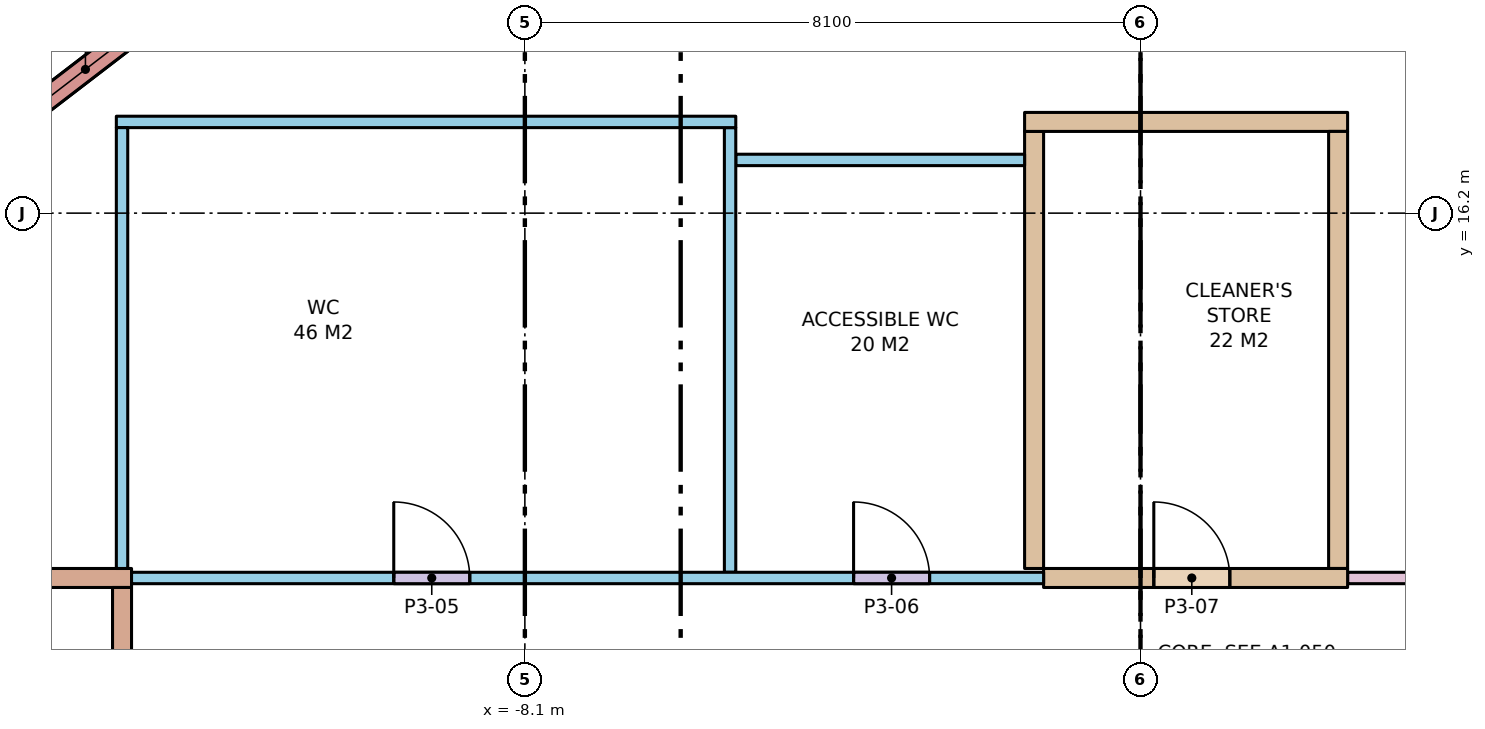
"""IFC4 building model, lengths in metres.
Left out: names, types, materials, properties, quantities, classifications, styles, units other than length and angle.
Written with IfcOpenShell. Run it as: python <this file> out.ifc"""

import sys

from ifc_helpers import new_model, si_unit, direction, frame, frame_2d, origin, place, context, subcontext, project, spatial, rectangle, extrude, element, fill, save


model = new_model("IFC4")
c1 = context("Model", 3, precision=1e-05, world=origin(), true_north=direction((0.0, 1.0)))
c2 = subcontext(c1, "Body", "Model", "MODEL_VIEW")
j1 = project(units=[si_unit("LENGTHUNIT", "METRE"), si_unit("PLANEANGLEUNIT", "RADIAN")], contexts=[c1])
p1 = place(None, origin())
s1 = spatial("IfcSite", under=j1, at=p1, CompositionType="ELEMENT")
p2 = place(p1, origin())
s2 = spatial("IfcBuilding", under=s1, at=p2, CompositionType="ELEMENT")
p3 = place(p2, frame((0.0, 0.0, 20.0)))
s3 = spatial("IfcBuildingStorey", under=s2, at=p3, CompositionType="ELEMENT", Elevation=20.0)
p4 = place(p3, frame((-11.5, 19.919, 0.0), z_axis=(0.0, 0.0, 1.0), x_axis=(-0.793339924758, -0.608778912074, 0.0)))
e1 = element("IfcWall", 1, at=p4, inside=s3, PredefinedType="STANDARD", context=c2, shape_type="SweptSolid", body=[
    extrude(rectangle(XDim=6.004, YDim=0.3, at=frame_2d((3.002, 0.0))), origin(), (0.0, 0.0, 1.0), 6.72),
])
p5 = place(p4, frame((1.702, 0.0, 0.8)))
e2 = element("IfcOpeningElement", 2, at=p5, cuts=e1, PredefinedType="OPENING", context=c2, shape_type="SweptSolid", body=[
    extrude(rectangle(XDim=2.6, YDim=5.4, at=frame_2d((1.3, 2.7))), frame((0.0, 0.16, 0.0), z_axis=(0.0, -1.0, 0.0), x_axis=(1.0, 0.0, 0.0)), (0.0, 0.0, 1.0), 0.32),
])
p6 = place(p3, frame((-1.4, 11.525, 0.0), z_axis=(0.0, 0.0, 1.0), x_axis=(0.0, 1.0, 0.0)))
e3 = element("IfcWall", 3, at=p6, inside=s3, PredefinedType="PARTITIONING", context=c2, shape_type="SweptSolid", body=[
    extrude(rectangle(XDim=5.75, YDim=0.25, at=frame_2d((2.875, 0.0))), origin(), (0.0, 0.0, 1.0), 6.72),
])
p7 = place(p3, frame((-5.325, 16.9, 0.0), z_axis=(0.0, 0.0, 1.0), x_axis=(1.0, 0.0, 0.0)))
e4 = element("IfcWall", 4, at=p7, inside=s3, PredefinedType="PARTITIONING", context=c2, shape_type="SweptSolid", body=[
    extrude(rectangle(XDim=3.8, YDim=0.15, at=frame_2d((1.9, 0.0))), origin(), (0.0, 0.0, 1.0), 6.72),
])
p8 = place(p3, frame((-5.4, 11.475, 0.0), z_axis=(0.0, 0.0, 1.0), x_axis=(0.0, 1.0, 0.0)))
e5 = element("IfcWall", 5, at=p8, inside=s3, PredefinedType="PARTITIONING", context=c2, shape_type="SweptSolid", body=[
    extrude(rectangle(XDim=5.85, YDim=0.15, at=frame_2d((2.925, 0.0))), origin(), (0.0, 0.0, 1.0), 6.72),
])
p9 = place(p3, frame((-1.525, 17.4, 0.0), z_axis=(0.0, 0.0, 1.0), x_axis=(1.0, 0.0, 0.0)))
e6 = element("IfcWall", 6, at=p9, inside=s3, PredefinedType="PARTITIONING", context=c2, shape_type="SweptSolid", body=[
    extrude(rectangle(XDim=4.25, YDim=0.25, at=frame_2d((2.125, 0.0))), origin(), (0.0, 0.0, 1.0), 6.72),
])
p10 = place(p3, frame((2.6, 11.525, 0.0), z_axis=(0.0, 0.0, 1.0), x_axis=(0.0, 1.0, 0.0)))
e7 = element("IfcWall", 7, at=p10, inside=s3, PredefinedType="PARTITIONING", context=c2, shape_type="SweptSolid", body=[
    extrude(rectangle(XDim=5.75, YDim=0.25, at=frame_2d((2.875, 0.0))), origin(), (0.0, 0.0, 1.0), 6.72),
])
p11 = place(p3, frame((-1.275, 11.4, 0.0), z_axis=(0.0, 0.0, 1.0), x_axis=(1.0, 0.0, 0.0)))
e8 = element("IfcWall", 8, at=p11, inside=s3, PredefinedType="PARTITIONING", context=c2, shape_type="SweptSolid", body=[
    extrude(rectangle(XDim=4.0, YDim=0.25, at=frame_2d((2.0, 0.0))), origin(), (0.0, 0.0, 1.0), 6.72),
])
p12 = place(p11, frame((1.45, 0.0, 0.0)))
e9 = element("IfcOpeningElement", 9, at=p12, cuts=e8, PredefinedType="OPENING", context=c2, shape_type="SweptSolid", body=[
    extrude(rectangle(XDim=1.0, YDim=2.1, at=frame_2d((0.5, 1.05))), frame((0.0, 0.135, 0.0), z_axis=(0.0, -1.0, 0.0), x_axis=(1.0, 0.0, 0.0)), (0.0, 0.0, 1.0), 0.27),
])
p13 = place(p3, frame((-16.875, 11.4, 0.0), z_axis=(0.0, 0.0, 1.0), x_axis=(1.0, 0.0, 0.0)))
e10 = element("IfcWall", 10, at=p13, inside=s3, PredefinedType="STANDARD", context=c2, shape_type="SweptSolid", body=[
    extrude(rectangle(XDim=3.6, YDim=0.25, at=frame_2d((1.8, 0.0))), origin(), (0.0, 0.0, 1.0), 6.72),
])
p14 = place(p3, frame((2.725, 11.4, 0.0), z_axis=(0.0, 0.0, 1.0), x_axis=(1.0, 0.0, 0.0)))
e11 = element("IfcWall", 11, at=p14, inside=s3, PredefinedType="PARTITIONING", context=c2, shape_type="SweptSolid", body=[
    extrude(rectangle(XDim=17.022, YDim=0.15, at=frame_2d((8.511, 0.0))), origin(), (0.0, 0.0, 1.0), 6.72),
])
p15 = place(p14, frame((4.45, 0.0, 0.0)))
e12 = element("IfcOpeningElement", 12, at=p15, cuts=e11, PredefinedType="OPENING", context=c2, shape_type="SweptSolid", body=[
    extrude(rectangle(XDim=1.8, YDim=2.4, at=frame_2d((0.9, 1.2))), frame((0.0, 0.085, 0.0), z_axis=(0.0, -1.0, 0.0), x_axis=(1.0, 0.0, 0.0)), (0.0, 0.0, 1.0), 0.17),
])
p16 = place(p3, frame((-13.475, 17.4, 0.0), z_axis=(0.0, 0.0, 1.0), x_axis=(1.0, 0.0, 0.0)))
e13 = element("IfcWall", 13, at=p16, inside=s3, PredefinedType="PARTITIONING", context=c2, shape_type="SweptSolid", body=[
    extrude(rectangle(XDim=8.15, YDim=0.15, at=frame_2d((4.075, 0.0))), origin(), (0.0, 0.0, 1.0), 6.72),
])
p17 = place(p3, frame((-13.4, 11.525, 0.0), z_axis=(0.0, 0.0, 1.0), x_axis=(0.0, 1.0, 0.0)))
e14 = element("IfcWall", 14, at=p17, inside=s3, PredefinedType="PARTITIONING", context=c2, shape_type="SweptSolid", body=[
    extrude(rectangle(XDim=5.8, YDim=0.15, at=frame_2d((2.9, 0.0))), origin(), (0.0, 0.0, 1.0), 6.72),
])
p18 = place(p3, frame((-13.4, 1.925, 0.0), z_axis=(0.0, 0.0, 1.0), x_axis=(0.0, 1.0, 0.0)))
e15 = element("IfcWall", 15, at=p18, inside=s3, PredefinedType="STANDARD", context=c2, shape_type="SweptSolid", body=[
    extrude(rectangle(XDim=9.35, YDim=0.25, at=frame_2d((4.675, 0.0))), origin(), (0.0, 0.0, 1.0), 6.72),
])
p19 = place(p18, frame((0.3, 0.0, 0.0)))
e16 = element("IfcOpeningElement", 16, at=p19, cuts=e15, PredefinedType="OPENING", context=c2, shape_type="SweptSolid", body=[
    extrude(rectangle(XDim=1.0, YDim=2.1, at=frame_2d((0.5, 1.05))), frame((0.0, 0.135, 0.0), z_axis=(0.0, -1.0, 0.0), x_axis=(1.0, 0.0, 0.0)), (0.0, 0.0, 1.0), 0.27),
])
p20 = place(p3, frame((-13.275, 11.4, 0.0), z_axis=(0.0, 0.0, 1.0), x_axis=(1.0, 0.0, 0.0)))
e17 = element("IfcWall", 17, at=p20, inside=s3, PredefinedType="PARTITIONING", context=c2, shape_type="SweptSolid", body=[
    extrude(rectangle(XDim=12.0, YDim=0.15, at=frame_2d((6.0, 0.0))), origin(), (0.0, 0.0, 1.0), 6.72),
])
p21 = place(p20, frame((3.45, 0.0, 0.0)))
e18 = element("IfcOpeningElement", 18, at=p21, cuts=e17, PredefinedType="OPENING", context=c2, shape_type="SweptSolid", body=[
    extrude(rectangle(XDim=1.0, YDim=2.1, at=frame_2d((0.5, 1.05))), frame((0.0, 0.085, 0.0), z_axis=(0.0, -1.0, 0.0), x_axis=(1.0, 0.0, 0.0)), (0.0, 0.0, 1.0), 0.17),
])
p22 = place(p20, frame((9.5, 0.0, 0.0)))
e19 = element("IfcOpeningElement", 19, at=p22, cuts=e17, PredefinedType="OPENING", context=c2, shape_type="SweptSolid", body=[
    extrude(rectangle(XDim=1.0, YDim=2.1, at=frame_2d((0.5, 1.05))), frame((0.0, 0.085, 0.0), z_axis=(0.0, -1.0, 0.0), x_axis=(1.0, 0.0, 0.0)), (0.0, 0.0, 1.0), 0.17),
])
p23 = place(p5, origin())
e20 = element("IfcWindow", 20, at=p23, inside=s3, PartitioningType="SINGLE_PANEL", PredefinedType="WINDOW", context=c2, shape_type="SweptSolid", body=[
    extrude(rectangle(XDim=2.6, YDim=5.4, at=frame_2d((1.3, 2.7))), frame((0.0, 0.03, 0.0), z_axis=(0.0, -1.0, 0.0), x_axis=(1.0, 0.0, 0.0)), (0.0, 0.0, 1.0), 0.06),
])
fill(e2, e20)
p24 = place(p21, origin())
e21 = element("IfcDoor", 21, at=p24, inside=s3, OperationType="SINGLE_SWING_LEFT", PredefinedType="DOOR", context=c2, shape_type="SweptSolid", body=[
    extrude(rectangle(XDim=1.0, YDim=2.1, at=frame_2d((0.5, 1.05))), frame((0.0, 0.025, 0.0), z_axis=(0.0, -1.0, 0.0), x_axis=(1.0, 0.0, 0.0)), (0.0, 0.0, 1.0), 0.05),
])
fill(e18, e21)
p25 = place(p22, origin())
e22 = element("IfcDoor", 22, at=p25, inside=s3, OperationType="SINGLE_SWING_LEFT", PredefinedType="DOOR", context=c2, shape_type="SweptSolid", body=[
    extrude(rectangle(XDim=1.0, YDim=2.1, at=frame_2d((0.5, 1.05))), frame((0.0, 0.025, 0.0), z_axis=(0.0, -1.0, 0.0), x_axis=(1.0, 0.0, 0.0)), (0.0, 0.0, 1.0), 0.05),
])
fill(e19, e22)
p26 = place(p12, origin())
e23 = element("IfcDoor", 23, at=p26, inside=s3, OperationType="SINGLE_SWING_LEFT", PredefinedType="DOOR", context=c2, shape_type="SweptSolid", body=[
    extrude(rectangle(XDim=1.0, YDim=2.1, at=frame_2d((0.5, 1.05))), frame((0.0, 0.025, 0.0), z_axis=(0.0, -1.0, 0.0), x_axis=(1.0, 0.0, 0.0)), (0.0, 0.0, 1.0), 0.05),
])
fill(e9, e23)
save(model, sys.argv[1])
